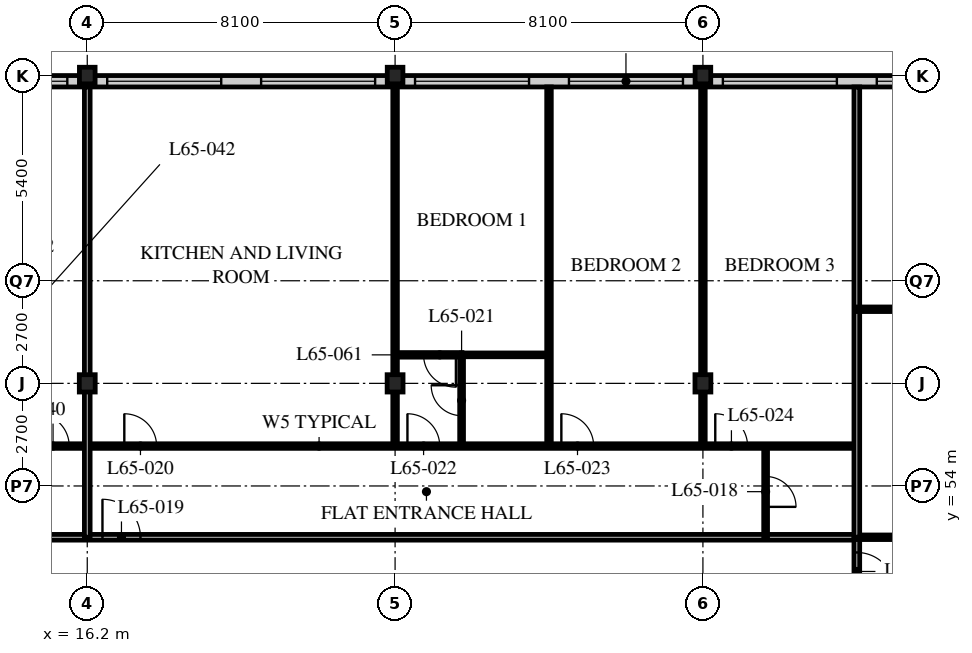
"""IFC4 building model, lengths in metres.
Left out: names, types, materials, properties, quantities, classifications, styles, units other than length and angle.
Written with IfcOpenShell. Run it as: python <this file> out.ifc"""

import sys

from ifc_helpers import new_model, si_unit, direction, frame, frame_2d, origin, origin_2d, place, context, subcontext, project, spatial, rectangle, i_section, extrude, element, fill, save


model = new_model("IFC4")
c1 = context("Model", 3, precision=1e-05, world=origin(), true_north=direction((0.0, 1.0)))
c2 = subcontext(c1, "Body", "Model", "MODEL_VIEW")
j1 = project(units=[si_unit("LENGTHUNIT", "METRE"), si_unit("PLANEANGLEUNIT", "RADIAN")], contexts=[c1])
p1 = place(None, origin())
s1 = spatial("IfcSite", under=j1, at=p1, CompositionType="ELEMENT")
p2 = place(p1, origin())
s2 = spatial("IfcBuilding", under=s1, at=p2, CompositionType="ELEMENT")
p3 = place(p2, frame((0.0, 0.0, 254.1)))
s3 = spatial("IfcBuildingStorey", under=s2, at=p3, CompositionType="ELEMENT", Elevation=254.1)
p4 = place(p3, frame((16.2, 56.7, 0.0), z_axis=(0.0, 0.0, 1.0), x_axis=(1.0, 0.0, 0.0)))
e1 = element("IfcColumn", 1, at=p4, inside=s3, PredefinedType="COLUMN", context=c2, shape_type="SweptSolid", body=[
    extrude(i_section(OverallWidth=0.418, OverallDepth=0.456, WebThickness=0.042, FlangeThickness=0.067, FilletRadius=0.015, at=origin_2d()), origin(), (0.0, 0.0, 1.0), 3.9),
])
p5 = place(p3, frame((16.2, 64.8, 0.0), z_axis=(0.0, 0.0, 1.0), x_axis=(1.0, 0.0, 0.0)))
e2 = element("IfcColumn", 2, at=p5, inside=s3, PredefinedType="COLUMN", context=c2, shape_type="SweptSolid", body=[
    extrude(i_section(OverallWidth=0.412, OverallDepth=0.437, WebThickness=0.036, FlangeThickness=0.058, FilletRadius=0.015, at=origin_2d()), origin(), (0.0, 0.0, 1.0), 3.9),
])
p6 = place(p3, frame((24.3, 56.7, 0.0), z_axis=(0.0, 0.0, 1.0), x_axis=(1.0, 0.0, 0.0)))
e3 = element("IfcColumn", 3, at=p6, inside=s3, PredefinedType="COLUMN", context=c2, shape_type="SweptSolid", body=[
    extrude(i_section(OverallWidth=0.418, OverallDepth=0.456, WebThickness=0.042, FlangeThickness=0.067, FilletRadius=0.015, at=origin_2d()), origin(), (0.0, 0.0, 1.0), 3.9),
])
p7 = place(p3, frame((24.3, 64.8, 0.0), z_axis=(0.0, 0.0, 1.0), x_axis=(1.0, 0.0, 0.0)))
e4 = element("IfcColumn", 4, at=p7, inside=s3, PredefinedType="COLUMN", context=c2, shape_type="SweptSolid", body=[
    extrude(i_section(OverallWidth=0.412, OverallDepth=0.437, WebThickness=0.036, FlangeThickness=0.058, FilletRadius=0.015, at=origin_2d()), origin(), (0.0, 0.0, 1.0), 3.9),
])
p8 = place(p3, frame((32.4, 56.7, 0.0), z_axis=(0.0, 0.0, 1.0), x_axis=(1.0, 0.0, 0.0)))
e5 = element("IfcColumn", 5, at=p8, inside=s3, PredefinedType="COLUMN", context=c2, shape_type="SweptSolid", body=[
    extrude(i_section(OverallWidth=0.418, OverallDepth=0.456, WebThickness=0.042, FlangeThickness=0.067, FilletRadius=0.015, at=origin_2d()), origin(), (0.0, 0.0, 1.0), 3.9),
])
p9 = place(p3, frame((32.4, 64.8, 0.0), z_axis=(0.0, 0.0, 1.0), x_axis=(1.0, 0.0, 0.0)))
e6 = element("IfcColumn", 6, at=p9, inside=s3, PredefinedType="COLUMN", context=c2, shape_type="SweptSolid", body=[
    extrude(i_section(OverallWidth=0.412, OverallDepth=0.437, WebThickness=0.036, FlangeThickness=0.058, FilletRadius=0.015, at=origin_2d()), origin(), (0.0, 0.0, 1.0), 3.9),
])
p10 = place(p3, frame((48.3, 64.65, 0.0), z_axis=(0.0, 0.0, 1.0), x_axis=(-1.0, 0.0, 0.0)))
e7 = element("IfcWall", 7, at=p10, inside=s3, PredefinedType="SOLIDWALL", context=c2, shape_type="SweptSolid", body=[
    extrude(rectangle(XDim=40.2, YDim=0.3, at=frame_2d((20.1, 0.0))), origin(), (0.0, 0.0, 1.0), 3.69),
])
p11 = place(p10, frame((0.225, 0.0, 0.6)))
e8 = element("IfcOpeningElement", 8, at=p11, cuts=e7, PredefinedType="OPENING", context=c2, shape_type="SweptSolid", body=[
    extrude(rectangle(XDim=3.0, YDim=2.4, at=frame_2d((1.5, 1.2))), frame((0.0, 0.16, 0.0), z_axis=(0.0, -1.0, 0.0), x_axis=(1.0, 0.0, 0.0)), (0.0, 0.0, 1.0), 0.32),
])
p12 = place(p10, frame((4.275, 0.0, 0.6)))
e9 = element("IfcOpeningElement", 9, at=p12, cuts=e7, PredefinedType="OPENING", context=c2, shape_type="SweptSolid", body=[
    extrude(rectangle(XDim=3.0, YDim=2.4, at=frame_2d((1.5, 1.2))), frame((0.0, 0.16, 0.0), z_axis=(0.0, -1.0, 0.0), x_axis=(1.0, 0.0, 0.0)), (0.0, 0.0, 1.0), 0.32),
])
p13 = place(p10, frame((8.325, 0.0, 0.6)))
e10 = element("IfcOpeningElement", 10, at=p13, cuts=e7, PredefinedType="OPENING", context=c2, shape_type="SweptSolid", body=[
    extrude(rectangle(XDim=3.0, YDim=2.4, at=frame_2d((1.5, 1.2))), frame((0.0, 0.16, 0.0), z_axis=(0.0, -1.0, 0.0), x_axis=(1.0, 0.0, 0.0)), (0.0, 0.0, 1.0), 0.32),
])
p14 = place(p10, frame((12.375, 0.0, 0.6)))
e11 = element("IfcOpeningElement", 11, at=p14, cuts=e7, PredefinedType="OPENING", context=c2, shape_type="SweptSolid", body=[
    extrude(rectangle(XDim=3.0, YDim=2.4, at=frame_2d((1.5, 1.2))), frame((0.0, 0.16, 0.0), z_axis=(0.0, -1.0, 0.0), x_axis=(1.0, 0.0, 0.0)), (0.0, 0.0, 1.0), 0.32),
])
p15 = place(p10, frame((16.425, 0.0, 0.6)))
e12 = element("IfcOpeningElement", 12, at=p15, cuts=e7, PredefinedType="OPENING", context=c2, shape_type="SweptSolid", body=[
    extrude(rectangle(XDim=3.0, YDim=2.4, at=frame_2d((1.5, 1.2))), frame((0.0, 0.16, 0.0), z_axis=(0.0, -1.0, 0.0), x_axis=(1.0, 0.0, 0.0)), (0.0, 0.0, 1.0), 0.32),
])
p16 = place(p10, frame((20.475, 0.0, 0.6)))
e13 = element("IfcOpeningElement", 13, at=p16, cuts=e7, PredefinedType="OPENING", context=c2, shape_type="SweptSolid", body=[
    extrude(rectangle(XDim=3.0, YDim=2.4, at=frame_2d((1.5, 1.2))), frame((0.0, 0.16, 0.0), z_axis=(0.0, -1.0, 0.0), x_axis=(1.0, 0.0, 0.0)), (0.0, 0.0, 1.0), 0.32),
])
p17 = place(p10, frame((24.525, 0.0, 0.6)))
e14 = element("IfcOpeningElement", 14, at=p17, cuts=e7, PredefinedType="OPENING", context=c2, shape_type="SweptSolid", body=[
    extrude(rectangle(XDim=3.0, YDim=2.4, at=frame_2d((1.5, 1.2))), frame((0.0, 0.16, 0.0), z_axis=(0.0, -1.0, 0.0), x_axis=(1.0, 0.0, 0.0)), (0.0, 0.0, 1.0), 0.32),
])
p18 = place(p10, frame((28.575, 0.0, 0.6)))
e15 = element("IfcOpeningElement", 15, at=p18, cuts=e7, PredefinedType="OPENING", context=c2, shape_type="SweptSolid", body=[
    extrude(rectangle(XDim=3.0, YDim=2.4, at=frame_2d((1.5, 1.2))), frame((0.0, 0.16, 0.0), z_axis=(0.0, -1.0, 0.0), x_axis=(1.0, 0.0, 0.0)), (0.0, 0.0, 1.0), 0.32),
])
p19 = place(p10, frame((32.625, 0.0, 0.6)))
e16 = element("IfcOpeningElement", 16, at=p19, cuts=e7, PredefinedType="OPENING", context=c2, shape_type="SweptSolid", body=[
    extrude(rectangle(XDim=3.0, YDim=2.4, at=frame_2d((1.5, 1.2))), frame((0.0, 0.16, 0.0), z_axis=(0.0, -1.0, 0.0), x_axis=(1.0, 0.0, 0.0)), (0.0, 0.0, 1.0), 0.32),
])
p20 = place(p10, frame((36.675, 0.0, 0.6)))
e17 = element("IfcOpeningElement", 17, at=p20, cuts=e7, PredefinedType="OPENING", context=c2, shape_type="SweptSolid", body=[
    extrude(rectangle(XDim=3.0, YDim=2.4, at=frame_2d((1.5, 1.2))), frame((0.0, 0.16, 0.0), z_axis=(0.0, -1.0, 0.0), x_axis=(1.0, 0.0, 0.0)), (0.0, 0.0, 1.0), 0.32),
])
p21 = place(p3, frame((12.15, 52.65, 0.0), z_axis=(0.0, 0.0, 1.0), x_axis=(1.0, 0.0, 0.0)))
e18 = element("IfcWall", 18, at=p21, inside=s3, PredefinedType="PARTITIONING", context=c2, shape_type="SweptSolid", body=[
    extrude(rectangle(XDim=24.3, YDim=0.15, at=frame_2d((12.15, 0.0))), origin(), (0.0, 0.0, 1.0), 3.69),
])
p22 = place(p21, frame((4.45, 0.0, 0.0)))
e19 = element("IfcOpeningElement", 19, at=p22, cuts=e18, PredefinedType="OPENING", context=c2, shape_type="SweptSolid", body=[
    extrude(rectangle(XDim=1.0, YDim=2.1, at=frame_2d((0.5, 1.05))), frame((0.0, 0.085, 0.0), z_axis=(0.0, -1.0, 0.0), x_axis=(1.0, 0.0, 0.0)), (0.0, 0.0, 1.0), 0.17),
])
p23 = place(p21, frame((1.525, 0.0, 0.0)))
e20 = element("IfcOpeningElement", 20, at=p23, cuts=e18, PredefinedType="OPENING", context=c2, shape_type="SweptSolid", body=[
    extrude(rectangle(XDim=1.0, YDim=2.1, at=frame_2d((0.5, 1.05))), frame((0.0, 0.085, 0.0), z_axis=(0.0, -1.0, 0.0), x_axis=(1.0, 0.0, 0.0)), (0.0, 0.0, 1.0), 0.17),
])
p24 = place(p3, frame((36.45, 50.85, 0.0), z_axis=(0.0, 0.0, 1.0), x_axis=(0.0, 1.0, 0.0)))
e21 = element("IfcWall", 21, at=p24, inside=s3, PredefinedType="PARTITIONING", context=c2, shape_type="SweptSolid", body=[
    extrude(rectangle(XDim=1.8, YDim=0.15, at=frame_2d((0.9, 0.0))), origin(), (0.0, 0.0, 1.0), 3.69),
])
p25 = place(p24, frame((0.4, 0.0, 0.0)))
e22 = element("IfcOpeningElement", 22, at=p25, cuts=e21, PredefinedType="OPENING", context=c2, shape_type="SweptSolid", body=[
    extrude(rectangle(XDim=1.0, YDim=2.1, at=frame_2d((0.5, 1.05))), frame((0.0, 0.085, 0.0), z_axis=(0.0, -1.0, 0.0), x_axis=(1.0, 0.0, 0.0)), (0.0, 0.0, 1.0), 0.17),
])
p26 = place(p3, frame((34.05, 52.65, 0.0), z_axis=(0.0, 0.0, 1.0), x_axis=(0.0, 1.0, 0.0)))
e23 = element("IfcWall", 23, at=p26, inside=s3, PredefinedType="PARTITIONING", context=c2, shape_type="SweptSolid", body=[
    extrude(rectangle(XDim=2.4, YDim=0.1, at=frame_2d((1.2, 0.0))), origin(), (0.0, 0.0, 1.0), 3.69),
])
p27 = place(p26, frame((0.8, 0.0, 0.0)))
e24 = element("IfcOpeningElement", 24, at=p27, cuts=e23, PredefinedType="OPENING", context=c2, shape_type="SweptSolid", body=[
    extrude(rectangle(XDim=0.8, YDim=2.1, at=frame_2d((0.4, 1.05))), frame((0.0, 0.06, 0.0), z_axis=(0.0, -1.0, 0.0), x_axis=(1.0, 0.0, 0.0)), (0.0, 0.0, 1.0), 0.12),
])
p28 = place(p3, frame((26.05, 55.05, 0.0), z_axis=(0.0, 0.0, 1.0), x_axis=(0.0, 1.0, 0.0)))
e25 = element("IfcWall", 25, at=p28, inside=s3, PredefinedType="PARTITIONING", context=c2, shape_type="SweptSolid", body=[
    extrude(rectangle(XDim=2.4, YDim=0.1, at=frame_2d((1.2, 0.0))), origin(), (0.0, 0.0, 1.0), 3.69),
])
p29 = place(p28, frame((0.8, 0.0, 0.0)))
e26 = element("IfcOpeningElement", 26, at=p29, cuts=e25, PredefinedType="OPENING", context=c2, shape_type="SweptSolid", body=[
    extrude(rectangle(XDim=0.8, YDim=2.1, at=frame_2d((0.4, 1.05))), frame((0.0, 0.06, 0.0), z_axis=(0.0, -1.0, 0.0), x_axis=(1.0, 0.0, 0.0)), (0.0, 0.0, 1.0), 0.12),
])
p30 = place(p3, frame((26.05, 57.45, 0.0), z_axis=(0.0, 0.0, 1.0), x_axis=(1.0, 0.0, 0.0)))
e27 = element("IfcWall", 27, at=p30, inside=s3, PredefinedType="PARTITIONING", context=c2, shape_type="SweptSolid", body=[
    extrude(rectangle(XDim=2.3, YDim=0.1, at=frame_2d((1.15, 0.0))), origin(), (0.0, 0.0, 1.0), 3.69),
])
p31 = place(p3, frame((24.3, 55.05, 0.0), z_axis=(0.0, 0.0, 1.0), x_axis=(0.0, 1.0, 0.0)))
e28 = element("IfcWall", 28, at=p31, inside=s3, PredefinedType="PARTITIONING", context=c2, shape_type="SweptSolid", body=[
    extrude(rectangle(XDim=9.45, YDim=0.12, at=frame_2d((4.725, 0.0))), origin(), (0.0, 0.0, 1.0), 3.078),
])
p32 = place(p3, frame((28.35, 55.05, 0.0), z_axis=(0.0, 0.0, 1.0), x_axis=(0.0, 1.0, 0.0)))
e29 = element("IfcWall", 29, at=p32, inside=s3, PredefinedType="PARTITIONING", context=c2, shape_type="SweptSolid", body=[
    extrude(rectangle(XDim=9.45, YDim=0.12, at=frame_2d((4.725, 0.0))), origin(), (0.0, 0.0, 1.0), 3.69),
])
p33 = place(p3, frame((32.4, 55.05, 0.0), z_axis=(0.0, 0.0, 1.0), x_axis=(0.0, 1.0, 0.0)))
e30 = element("IfcWall", 30, at=p33, inside=s3, PredefinedType="PARTITIONING", context=c2, shape_type="SweptSolid", body=[
    extrude(rectangle(XDim=9.45, YDim=0.12, at=frame_2d((4.725, 0.0))), origin(), (0.0, 0.0, 1.0), 3.078),
])
p34 = place(p3, frame((8.15, 55.05, 0.0), z_axis=(0.0, 0.0, 1.0), x_axis=(1.0, 0.0, 0.0)))
e31 = element("IfcWall", 31, at=p34, inside=s3, PredefinedType="PARTITIONING", context=c2, shape_type="SweptSolid", body=[
    extrude(rectangle(XDim=28.3, YDim=0.12, at=frame_2d((14.15, 0.0))), origin(), (0.0, 0.0, 1.0), 3.69),
])
p35 = place(p34, frame((9.025, 0.0, 0.0)))
e32 = element("IfcOpeningElement", 32, at=p35, cuts=e31, PredefinedType="OPENING", context=c2, shape_type="SweptSolid", body=[
    extrude(rectangle(XDim=0.85, YDim=2.1, at=frame_2d((0.425, 1.05))), frame((0.0, 0.07, 0.0), z_axis=(0.0, -1.0, 0.0), x_axis=(1.0, 0.0, 0.0)), (0.0, 0.0, 1.0), 0.14),
])
p36 = place(p34, frame((16.475, 0.0, 0.0)))
e33 = element("IfcOpeningElement", 33, at=p36, cuts=e31, PredefinedType="OPENING", context=c2, shape_type="SweptSolid", body=[
    extrude(rectangle(XDim=0.85, YDim=2.1, at=frame_2d((0.425, 1.05))), frame((0.0, 0.07, 0.0), z_axis=(0.0, -1.0, 0.0), x_axis=(1.0, 0.0, 0.0)), (0.0, 0.0, 1.0), 0.14),
])
p37 = place(p34, frame((20.525, 0.0, 0.0)))
e34 = element("IfcOpeningElement", 34, at=p37, cuts=e31, PredefinedType="OPENING", context=c2, shape_type="SweptSolid", body=[
    extrude(rectangle(XDim=0.85, YDim=2.1, at=frame_2d((0.425, 1.05))), frame((0.0, 0.07, 0.0), z_axis=(0.0, -1.0, 0.0), x_axis=(1.0, 0.0, 0.0)), (0.0, 0.0, 1.0), 0.14),
])
p38 = place(p34, frame((24.575, 0.0, 0.0)))
e35 = element("IfcOpeningElement", 35, at=p38, cuts=e31, PredefinedType="OPENING", context=c2, shape_type="SweptSolid", body=[
    extrude(rectangle(XDim=0.85, YDim=2.1, at=frame_2d((0.425, 1.05))), frame((0.0, 0.07, 0.0), z_axis=(0.0, -1.0, 0.0), x_axis=(1.0, 0.0, 0.0)), (0.0, 0.0, 1.0), 0.14),
])
p39 = place(p34, frame((6.725, 0.0, 0.0)))
e36 = element("IfcOpeningElement", 36, at=p39, cuts=e31, PredefinedType="OPENING", context=c2, shape_type="SweptSolid", body=[
    extrude(rectangle(XDim=0.85, YDim=2.1, at=frame_2d((0.425, 1.05))), frame((0.0, 0.07, 0.0), z_axis=(0.0, -1.0, 0.0), x_axis=(1.0, 0.0, 0.0)), (0.0, 0.0, 1.0), 0.14),
])
p40 = place(p34, frame((2.875, 0.0, 0.0)))
e37 = element("IfcOpeningElement", 37, at=p40, cuts=e31, PredefinedType="OPENING", context=c2, shape_type="SweptSolid", body=[
    extrude(rectangle(XDim=0.85, YDim=2.1, at=frame_2d((0.425, 1.05))), frame((0.0, 0.07, 0.0), z_axis=(0.0, -1.0, 0.0), x_axis=(1.0, 0.0, 0.0)), (0.0, 0.0, 1.0), 0.14),
])
p41 = place(p3, frame((16.2, 52.65, 0.0), z_axis=(0.0, 0.0, 1.0), x_axis=(0.0, 1.0, 0.0)))
e38 = element("IfcWall", 38, at=p41, inside=s3, PredefinedType="PARTITIONING", context=c2, shape_type="SweptSolid", body=[
    extrude(rectangle(XDim=11.85, YDim=0.15, at=frame_2d((5.925, 0.0))), origin(), (0.0, 0.0, 1.0), 3.078),
])
p42 = place(p3, frame((36.45, 52.65, 0.0), z_axis=(0.0, 0.0, 1.0), x_axis=(1.0, 0.0, 0.0)))
e39 = element("IfcWall", 39, at=p42, inside=s3, PredefinedType="PARTITIONING", context=c2, shape_type="SweptSolid", body=[
    extrude(rectangle(XDim=6.45, YDim=0.12, at=frame_2d((3.225, 0.0))), origin(), (0.0, 0.0, 1.0), 3.69),
])
p43 = place(p42, frame((2.8, 0.0, 0.0)))
e40 = element("IfcOpeningElement", 40, at=p43, cuts=e39, PredefinedType="OPENING", context=c2, shape_type="SweptSolid", body=[
    extrude(rectangle(XDim=0.85, YDim=2.1, at=frame_2d((0.425, 1.05))), frame((0.0, 0.07, 0.0), z_axis=(0.0, -1.0, 0.0), x_axis=(1.0, 0.0, 0.0)), (0.0, 0.0, 1.0), 0.14),
])
p44 = place(p3, frame((36.45, 64.5, 0.0), z_axis=(0.0, 0.0, 1.0), x_axis=(0.0, -1.0, 0.0)))
e41 = element("IfcWall", 41, at=p44, inside=s3, PredefinedType="PARTITIONING", context=c2, shape_type="SweptSolid", body=[
    extrude(rectangle(XDim=11.85, YDim=0.15, at=frame_2d((5.925, 0.0))), origin(), (0.0, 0.0, 1.0), 3.69),
])
p45 = place(p3, frame((36.45, 58.65, 0.0), z_axis=(0.0, 0.0, 1.0), x_axis=(1.0, 0.0, 0.0)))
e42 = element("IfcWall", 42, at=p45, inside=s3, PredefinedType="PARTITIONING", context=c2, shape_type="SweptSolid", body=[
    extrude(rectangle(XDim=15.9, YDim=0.12, at=frame_2d((7.95, 0.0))), origin(), (0.0, 0.0, 1.0), 3.69),
])
p46 = place(p45, frame((1.675, 0.0, 0.0)))
e43 = element("IfcOpeningElement", 43, at=p46, cuts=e42, PredefinedType="OPENING", context=c2, shape_type="SweptSolid", body=[
    extrude(rectangle(XDim=0.85, YDim=2.1, at=frame_2d((0.425, 1.05))), frame((0.0, 0.07, 0.0), z_axis=(0.0, -1.0, 0.0), x_axis=(1.0, 0.0, 0.0)), (0.0, 0.0, 1.0), 0.14),
])
p47 = place(p3, frame((24.3, 57.45, 0.0), z_axis=(0.0, 0.0, 1.0), x_axis=(1.0, 0.0, 0.0)))
e44 = element("IfcWall", 44, at=p47, inside=s3, PredefinedType="PARTITIONING", context=c2, shape_type="SweptSolid", body=[
    extrude(rectangle(XDim=1.76, YDim=0.12, at=frame_2d((0.88, 0.0))), origin(), (0.0, 0.0, 1.0), 3.69),
])
p48 = place(p47, frame((0.75, 0.0, 0.0)))
e45 = element("IfcOpeningElement", 45, at=p48, cuts=e44, PredefinedType="OPENING", context=c2, shape_type="SweptSolid", body=[
    extrude(rectangle(XDim=0.85, YDim=2.1, at=frame_2d((0.425, 1.05))), frame((0.0, 0.07, 0.0), z_axis=(0.0, -1.0, 0.0), x_axis=(1.0, 0.0, 0.0)), (0.0, 0.0, 1.0), 0.14),
])
p49 = place(p13, origin())
e46 = element("IfcWindow", 46, at=p49, inside=s3, PartitioningType="SINGLE_PANEL", PredefinedType="WINDOW", context=c2, shape_type="SweptSolid", body=[
    extrude(rectangle(XDim=3.0, YDim=2.4, at=frame_2d((1.5, 1.2))), frame((0.0, 0.03, 0.0), z_axis=(0.0, -1.0, 0.0), x_axis=(1.0, 0.0, 0.0)), (0.0, 0.0, 1.0), 0.06),
])
fill(e10, e46)
p50 = place(p14, origin())
e47 = element("IfcWindow", 47, at=p50, inside=s3, PartitioningType="SINGLE_PANEL", PredefinedType="WINDOW", context=c2, shape_type="SweptSolid", body=[
    extrude(rectangle(XDim=3.0, YDim=2.4, at=frame_2d((1.5, 1.2))), frame((0.0, 0.03, 0.0), z_axis=(0.0, -1.0, 0.0), x_axis=(1.0, 0.0, 0.0)), (0.0, 0.0, 1.0), 0.06),
])
fill(e11, e47)
p51 = place(p15, origin())
e48 = element("IfcWindow", 48, at=p51, inside=s3, PartitioningType="SINGLE_PANEL", PredefinedType="WINDOW", context=c2, shape_type="SweptSolid", body=[
    extrude(rectangle(XDim=3.0, YDim=2.4, at=frame_2d((1.5, 1.2))), frame((0.0, 0.03, 0.0), z_axis=(0.0, -1.0, 0.0), x_axis=(1.0, 0.0, 0.0)), (0.0, 0.0, 1.0), 0.06),
])
fill(e12, e48)
p52 = place(p16, origin())
e49 = element("IfcWindow", 49, at=p52, inside=s3, PartitioningType="SINGLE_PANEL", PredefinedType="WINDOW", context=c2, shape_type="SweptSolid", body=[
    extrude(rectangle(XDim=3.0, YDim=2.4, at=frame_2d((1.5, 1.2))), frame((0.0, 0.03, 0.0), z_axis=(0.0, -1.0, 0.0), x_axis=(1.0, 0.0, 0.0)), (0.0, 0.0, 1.0), 0.06),
])
fill(e13, e49)
p53 = place(p17, origin())
e50 = element("IfcWindow", 50, at=p53, inside=s3, PartitioningType="SINGLE_PANEL", PredefinedType="WINDOW", context=c2, shape_type="SweptSolid", body=[
    extrude(rectangle(XDim=3.0, YDim=2.4, at=frame_2d((1.5, 1.2))), frame((0.0, 0.03, 0.0), z_axis=(0.0, -1.0, 0.0), x_axis=(1.0, 0.0, 0.0)), (0.0, 0.0, 1.0), 0.06),
])
fill(e14, e50)
p54 = place(p18, origin())
e51 = element("IfcWindow", 51, at=p54, inside=s3, PartitioningType="SINGLE_PANEL", PredefinedType="WINDOW", context=c2, shape_type="SweptSolid", body=[
    extrude(rectangle(XDim=3.0, YDim=2.4, at=frame_2d((1.5, 1.2))), frame((0.0, 0.03, 0.0), z_axis=(0.0, -1.0, 0.0), x_axis=(1.0, 0.0, 0.0)), (0.0, 0.0, 1.0), 0.06),
])
fill(e15, e51)
p55 = place(p19, origin())
e52 = element("IfcWindow", 52, at=p55, inside=s3, PartitioningType="SINGLE_PANEL", PredefinedType="WINDOW", context=c2, shape_type="SweptSolid", body=[
    extrude(rectangle(XDim=3.0, YDim=2.4, at=frame_2d((1.5, 1.2))), frame((0.0, 0.03, 0.0), z_axis=(0.0, -1.0, 0.0), x_axis=(1.0, 0.0, 0.0)), (0.0, 0.0, 1.0), 0.06),
])
fill(e16, e52)
p56 = place(p27, origin())
e53 = element("IfcDoor", 53, at=p56, inside=s3, OperationType="SINGLE_SWING_RIGHT", PredefinedType="DOOR", context=c2, shape_type="SweptSolid", body=[
    extrude(rectangle(XDim=0.8, YDim=2.1, at=frame_2d((0.4, 1.05))), frame((0.0, 0.025, 0.0), z_axis=(0.0, -1.0, 0.0), x_axis=(1.0, 0.0, 0.0)), (0.0, 0.0, 1.0), 0.05),
])
fill(e24, e53)
p57 = place(p22, origin())
e54 = element("IfcDoor", 54, at=p57, inside=s3, OperationType="SINGLE_SWING_LEFT", PredefinedType="DOOR", context=c2, shape_type="SweptSolid", body=[
    extrude(rectangle(XDim=1.0, YDim=2.1, at=frame_2d((0.5, 1.05))), frame((0.0, 0.025, 0.0), z_axis=(0.0, -1.0, 0.0), x_axis=(1.0, 0.0, 0.0)), (0.0, 0.0, 1.0), 0.05),
])
fill(e19, e54)
p58 = place(p35, origin())
e55 = element("IfcDoor", 55, at=p58, inside=s3, OperationType="SINGLE_SWING_LEFT", PredefinedType="DOOR", context=c2, shape_type="SweptSolid", body=[
    extrude(rectangle(XDim=0.85, YDim=2.1, at=frame_2d((0.425, 1.05))), frame((0.0, 0.025, 0.0), z_axis=(0.0, -1.0, 0.0), x_axis=(1.0, 0.0, 0.0)), (0.0, 0.0, 1.0), 0.05),
])
fill(e32, e55)
p59 = place(p29, origin())
e56 = element("IfcDoor", 56, at=p59, inside=s3, OperationType="SINGLE_SWING_RIGHT", PredefinedType="DOOR", context=c2, shape_type="SweptSolid", body=[
    extrude(rectangle(XDim=0.8, YDim=2.1, at=frame_2d((0.4, 1.05))), frame((0.0, 0.025, 0.0), z_axis=(0.0, -1.0, 0.0), x_axis=(1.0, 0.0, 0.0)), (0.0, 0.0, 1.0), 0.05),
])
fill(e26, e56)
p60 = place(p36, origin())
e57 = element("IfcDoor", 57, at=p60, inside=s3, OperationType="SINGLE_SWING_LEFT", PredefinedType="DOOR", context=c2, shape_type="SweptSolid", body=[
    extrude(rectangle(XDim=0.85, YDim=2.1, at=frame_2d((0.425, 1.05))), frame((0.0, 0.025, 0.0), z_axis=(0.0, -1.0, 0.0), x_axis=(1.0, 0.0, 0.0)), (0.0, 0.0, 1.0), 0.05),
])
fill(e33, e57)
p61 = place(p37, origin())
e58 = element("IfcDoor", 58, at=p61, inside=s3, OperationType="SINGLE_SWING_LEFT", PredefinedType="DOOR", context=c2, shape_type="SweptSolid", body=[
    extrude(rectangle(XDim=0.85, YDim=2.1, at=frame_2d((0.425, 1.05))), frame((0.0, 0.025, 0.0), z_axis=(0.0, -1.0, 0.0), x_axis=(1.0, 0.0, 0.0)), (0.0, 0.0, 1.0), 0.05),
])
fill(e34, e58)
p62 = place(p38, origin())
e59 = element("IfcDoor", 59, at=p62, inside=s3, OperationType="SINGLE_SWING_LEFT", PredefinedType="DOOR", context=c2, shape_type="SweptSolid", body=[
    extrude(rectangle(XDim=0.85, YDim=2.1, at=frame_2d((0.425, 1.05))), frame((0.0, 0.025, 0.0), z_axis=(0.0, -1.0, 0.0), x_axis=(1.0, 0.0, 0.0)), (0.0, 0.0, 1.0), 0.05),
])
fill(e35, e59)
p63 = place(p39, origin())
e60 = element("IfcDoor", 60, at=p63, inside=s3, OperationType="SINGLE_SWING_LEFT", PredefinedType="DOOR", context=c2, shape_type="SweptSolid", body=[
    extrude(rectangle(XDim=0.85, YDim=2.1, at=frame_2d((0.425, 1.05))), frame((0.0, 0.025, 0.0), z_axis=(0.0, -1.0, 0.0), x_axis=(1.0, 0.0, 0.0)), (0.0, 0.0, 1.0), 0.05),
])
fill(e36, e60)
p64 = place(p25, origin())
e61 = element("IfcDoor", 61, at=p64, inside=s3, OperationType="SINGLE_SWING_RIGHT", PredefinedType="DOOR", context=c2, shape_type="SweptSolid", body=[
    extrude(rectangle(XDim=1.0, YDim=2.1, at=frame_2d((0.5, 1.05))), frame((0.0, 0.025, 0.0), z_axis=(0.0, -1.0, 0.0), x_axis=(1.0, 0.0, 0.0)), (0.0, 0.0, 1.0), 0.05),
])
fill(e22, e61)
p65 = place(p48, origin())
e62 = element("IfcDoor", 62, at=p65, inside=s3, OperationType="SINGLE_SWING_LEFT", PredefinedType="DOOR", context=c2, shape_type="SweptSolid", body=[
    extrude(rectangle(XDim=0.85, YDim=2.1, at=frame_2d((0.425, 1.05))), frame((0.0, 0.025, 0.0), z_axis=(0.0, -1.0, 0.0), x_axis=(1.0, 0.0, 0.0)), (0.0, 0.0, 1.0), 0.05),
])
fill(e45, e62)
save(model, sys.argv[1])
